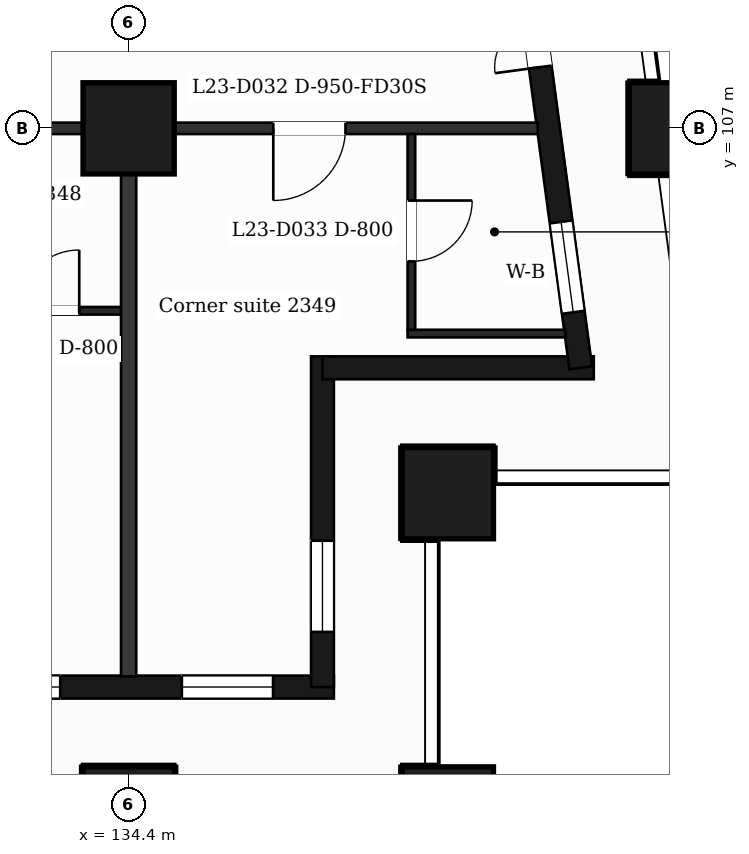
"""IFC4 building model, lengths in metres.
Left out: names, types, materials, properties, quantities, classifications, styles, units other than length and angle.
Written with IfcOpenShell. Run it as: python <this file> out.ifc"""

import sys

from ifc_helpers import new_model, si_unit, direction, frame, frame_2d, origin, origin_2d, place, context, subcontext, project, spatial, rectangle, extrude, element, fill, save


model = new_model("IFC4")
c1 = context("Model", 3, precision=1e-05, world=origin(), true_north=direction((0.0, 1.0)))
c2 = subcontext(c1, "Body", "Model", "MODEL_VIEW")
j1 = project(units=[si_unit("LENGTHUNIT", "METRE"), si_unit("PLANEANGLEUNIT", "RADIAN")], contexts=[c1])
p1 = place(None, origin())
s1 = spatial("IfcSite", under=j1, at=p1, CompositionType="ELEMENT")
p2 = place(p1, origin())
s2 = spatial("IfcBuilding", under=s1, at=p2, CompositionType="ELEMENT")
p3 = place(p2, frame((0.0, 0.0, 102.1)))
s3 = spatial("IfcBuildingStorey", under=s2, at=p3, CompositionType="ELEMENT", Elevation=102.1)
for number, where, z_axis, x_axis in (
    (1, (134.4, 98.0, 0.0), (0.0, 0.0, 1.0), (1.0, 0.0, 0.0)),
    (2, (138.6, 98.0, 0.0), (0.0, 0.0, 1.0), (1.0, 0.0, 0.0)),
    (3, (138.6, 102.2, 0.0), (0.0, 0.0, 1.0), (1.0, 0.0, 0.0)),
    (4, (134.4, 107.0, 0.0), (0.0, 0.0, 1.0), (1.0, 0.0, 0.0)),
    (5, (141.588, 107.0, 0.0), (0.0, 0.0, 1.0), (1.0, 0.0, 0.0)),
):
    element("IfcColumn", number, at=place(p3, frame(where, z_axis=z_axis, x_axis=x_axis)), inside=s3, PredefinedType="COLUMN", context=c2, shape_type="SweptSolid", body=[
        extrude(rectangle(XDim=1.2, YDim=1.2, at=origin_2d()), origin(), (0.0, 0.0, 1.0), 3.7),
    ])
p4 = place(p3, frame((89.85, 99.65, 0.0), z_axis=(0.0, 0.0, 1.0), x_axis=(1.0, 0.0, 0.0)))
e6 = element("IfcWall", 6, at=p4, inside=s3, PredefinedType="SOLIDWALL", context=c2, shape_type="SweptSolid", body=[
    extrude(rectangle(XDim=47.25, YDim=0.3, at=frame_2d((23.625, 0.0))), origin(), (0.0, 0.0, 1.0), 3.38),
])
p5 = place(p4, frame((0.725, 0.0, 0.9)))
e7 = element("IfcOpeningElement", 7, at=p5, cuts=e6, PredefinedType="OPENING", context=c2, shape_type="SweptSolid", body=[
    extrude(rectangle(XDim=1.2, YDim=2.1, at=frame_2d((0.6, 1.05))), frame((0.0, 0.16, 0.0), z_axis=(0.0, -1.0, 0.0), x_axis=(1.0, 0.0, 0.0)), (0.0, 0.0, 1.0), 0.32),
])
p6 = place(p4, frame((3.45, 0.0, 0.9)))
e8 = element("IfcOpeningElement", 8, at=p6, cuts=e6, PredefinedType="OPENING", context=c2, shape_type="SweptSolid", body=[
    extrude(rectangle(XDim=2.4, YDim=2.1, at=frame_2d((1.2, 1.05))), frame((0.0, 0.16, 0.0), z_axis=(0.0, -1.0, 0.0), x_axis=(1.0, 0.0, 0.0)), (0.0, 0.0, 1.0), 0.32),
])
p7 = place(p4, frame((7.35, 0.0, 0.0)))
e9 = element("IfcOpeningElement", 9, at=p7, cuts=e6, PredefinedType="OPENING", context=c2, shape_type="SweptSolid", body=[
    extrude(rectangle(XDim=1.2, YDim=2.4, at=frame_2d((0.6, 1.2))), frame((0.0, 0.16, 0.0), z_axis=(0.0, -1.0, 0.0), x_axis=(1.0, 0.0, 0.0)), (0.0, 0.0, 1.0), 0.32),
])
p8 = place(p4, frame((9.15, 0.0, 0.9)))
e10 = element("IfcOpeningElement", 10, at=p8, cuts=e6, PredefinedType="OPENING", context=c2, shape_type="SweptSolid", body=[
    extrude(rectangle(XDim=1.2, YDim=2.1, at=frame_2d((0.6, 1.05))), frame((0.0, 0.16, 0.0), z_axis=(0.0, -1.0, 0.0), x_axis=(1.0, 0.0, 0.0)), (0.0, 0.0, 1.0), 0.32),
])
p9 = place(p4, frame((11.85, 0.0, 0.9)))
e11 = element("IfcOpeningElement", 11, at=p9, cuts=e6, PredefinedType="OPENING", context=c2, shape_type="SweptSolid", body=[
    extrude(rectangle(XDim=2.4, YDim=2.1, at=frame_2d((1.2, 1.05))), frame((0.0, 0.16, 0.0), z_axis=(0.0, -1.0, 0.0), x_axis=(1.0, 0.0, 0.0)), (0.0, 0.0, 1.0), 0.32),
])
p10 = place(p4, frame((16.05, 0.0, 0.9)))
e12 = element("IfcOpeningElement", 12, at=p10, cuts=e6, PredefinedType="OPENING", context=c2, shape_type="SweptSolid", body=[
    extrude(rectangle(XDim=2.4, YDim=2.1, at=frame_2d((1.2, 1.05))), frame((0.0, 0.16, 0.0), z_axis=(0.0, -1.0, 0.0), x_axis=(1.0, 0.0, 0.0)), (0.0, 0.0, 1.0), 0.32),
])
p11 = place(p4, frame((20.85, 0.0, 0.9)))
e13 = element("IfcOpeningElement", 13, at=p11, cuts=e6, PredefinedType="OPENING", context=c2, shape_type="SweptSolid", body=[
    extrude(rectangle(XDim=1.2, YDim=2.1, at=frame_2d((0.6, 1.05))), frame((0.0, 0.16, 0.0), z_axis=(0.0, -1.0, 0.0), x_axis=(1.0, 0.0, 0.0)), (0.0, 0.0, 1.0), 0.32),
])
p12 = place(p4, frame((25.05, 0.0, 0.9)))
e14 = element("IfcOpeningElement", 14, at=p12, cuts=e6, PredefinedType="OPENING", context=c2, shape_type="SweptSolid", body=[
    extrude(rectangle(XDim=1.2, YDim=2.1, at=frame_2d((0.6, 1.05))), frame((0.0, 0.16, 0.0), z_axis=(0.0, -1.0, 0.0), x_axis=(1.0, 0.0, 0.0)), (0.0, 0.0, 1.0), 0.32),
])
p13 = place(p4, frame((28.65, 0.0, 0.9)))
e15 = element("IfcOpeningElement", 15, at=p13, cuts=e6, PredefinedType="OPENING", context=c2, shape_type="SweptSolid", body=[
    extrude(rectangle(XDim=2.4, YDim=2.1, at=frame_2d((1.2, 1.05))), frame((0.0, 0.16, 0.0), z_axis=(0.0, -1.0, 0.0), x_axis=(1.0, 0.0, 0.0)), (0.0, 0.0, 1.0), 0.32),
])
p14 = place(p4, frame((32.85, 0.0, 0.9)))
e16 = element("IfcOpeningElement", 16, at=p14, cuts=e6, PredefinedType="OPENING", context=c2, shape_type="SweptSolid", body=[
    extrude(rectangle(XDim=2.4, YDim=2.1, at=frame_2d((1.2, 1.05))), frame((0.0, 0.16, 0.0), z_axis=(0.0, -1.0, 0.0), x_axis=(1.0, 0.0, 0.0)), (0.0, 0.0, 1.0), 0.32),
])
p15 = place(p4, frame((37.05, 0.0, 0.9)))
e17 = element("IfcOpeningElement", 17, at=p15, cuts=e6, PredefinedType="OPENING", context=c2, shape_type="SweptSolid", body=[
    extrude(rectangle(XDim=2.4, YDim=2.1, at=frame_2d((1.2, 1.05))), frame((0.0, 0.16, 0.0), z_axis=(0.0, -1.0, 0.0), x_axis=(1.0, 0.0, 0.0)), (0.0, 0.0, 1.0), 0.32),
])
p16 = place(p4, frame((41.25, 0.0, 0.9)))
e18 = element("IfcOpeningElement", 18, at=p16, cuts=e6, PredefinedType="OPENING", context=c2, shape_type="SweptSolid", body=[
    extrude(rectangle(XDim=2.4, YDim=2.1, at=frame_2d((1.2, 1.05))), frame((0.0, 0.16, 0.0), z_axis=(0.0, -1.0, 0.0), x_axis=(1.0, 0.0, 0.0)), (0.0, 0.0, 1.0), 0.32),
])
p17 = place(p4, frame((45.25, 0.0, 0.9)))
e19 = element("IfcOpeningElement", 19, at=p17, cuts=e6, PredefinedType="OPENING", context=c2, shape_type="SweptSolid", body=[
    extrude(rectangle(XDim=1.2, YDim=2.1, at=frame_2d((0.6, 1.05))), frame((0.0, 0.16, 0.0), z_axis=(0.0, -1.0, 0.0), x_axis=(1.0, 0.0, 0.0)), (0.0, 0.0, 1.0), 0.32),
])
p18 = place(p3, frame((136.95, 99.65, 0.0), z_axis=(0.0, 0.0, 1.0), x_axis=(0.0, 1.0, 0.0)))
e20 = element("IfcWall", 20, at=p18, inside=s3, PredefinedType="SOLIDWALL", context=c2, shape_type="SweptSolid", body=[
    extrude(rectangle(XDim=4.35, YDim=0.3, at=frame_2d((2.175, 0.0))), origin(), (0.0, 0.0, 1.0), 3.38),
])
p19 = place(p18, frame((0.725, 0.0, 0.9)))
e21 = element("IfcOpeningElement", 21, at=p19, cuts=e20, PredefinedType="OPENING", context=c2, shape_type="SweptSolid", body=[
    extrude(rectangle(XDim=1.2, YDim=2.1, at=frame_2d((0.6, 1.05))), frame((0.0, 0.16, 0.0), z_axis=(0.0, -1.0, 0.0), x_axis=(1.0, 0.0, 0.0)), (0.0, 0.0, 1.0), 0.32),
])
p20 = place(p3, frame((136.95, 103.85, 0.0), z_axis=(0.0, 0.0, 1.0), x_axis=(1.0, 0.0, 0.0)))
e22 = element("IfcWall", 22, at=p20, inside=s3, PredefinedType="SOLIDWALL", context=c2, shape_type="SweptSolid", body=[
    extrude(rectangle(XDim=3.569, YDim=0.3, at=frame_2d((1.785, 0.0))), origin(), (0.0, 0.0, 1.0), 3.38),
])
p21 = place(p3, frame((140.348, 103.85, 0.0), z_axis=(0.0, 0.0, 1.0), x_axis=(-0.133431549479, 0.991058031401, 0.0)))
e23 = element("IfcWall", 23, at=p21, inside=s3, PredefinedType="SOLIDWALL", context=c2, shape_type="SweptSolid", body=[
    extrude(rectangle(XDim=6.609, YDim=0.3, at=frame_2d((3.304, 0.0))), origin(), (0.0, 0.0, 1.0), 3.38),
])
p22 = place(p21, frame((0.737, 0.0, 0.9)))
e24 = element("IfcOpeningElement", 24, at=p22, cuts=e23, PredefinedType="OPENING", context=c2, shape_type="SweptSolid", body=[
    extrude(rectangle(XDim=1.2, YDim=2.1, at=frame_2d((0.6, 1.05))), frame((0.0, 0.16, 0.0), z_axis=(0.0, -1.0, 0.0), x_axis=(1.0, 0.0, 0.0)), (0.0, 0.0, 1.0), 0.32),
])
p23 = place(p21, frame((3.991, 0.0, 0.0)))
e25 = element("IfcOpeningElement", 25, at=p23, cuts=e23, PredefinedType="OPENING", context=c2, shape_type="SweptSolid", body=[
    extrude(rectangle(XDim=1.2, YDim=2.4, at=frame_2d((0.6, 1.2))), frame((0.0, 0.16, 0.0), z_axis=(0.0, -1.0, 0.0), x_axis=(1.0, 0.0, 0.0)), (0.0, 0.0, 1.0), 0.32),
])
p24 = place(p3, frame((138.07, 104.3, 0.0), z_axis=(0.0, 0.0, 1.0), x_axis=(1.0, 0.0, 0.0)))
e26 = element("IfcWall", 26, at=p24, inside=s3, PredefinedType="PARTITIONING", context=c2, shape_type="SweptSolid", body=[
    extrude(rectangle(XDim=2.076, YDim=0.1, at=frame_2d((1.038, 0.0))), origin(), (0.0, 0.0, 1.0), 3.38),
])
p25 = place(p3, frame((131.65, 104.6, 0.0), z_axis=(0.0, 0.0, 1.0), x_axis=(1.0, 0.0, 0.0)))
e27 = element("IfcWall", 27, at=p25, inside=s3, PredefinedType="PARTITIONING", context=c2, shape_type="SweptSolid", body=[
    extrude(rectangle(XDim=2.75, YDim=0.1, at=frame_2d((1.375, 0.0))), origin(), (0.0, 0.0, 1.0), 3.38),
])
p26 = place(p25, frame((1.3, 0.0, 0.0)))
e28 = element("IfcOpeningElement", 28, at=p26, cuts=e27, PredefinedType="OPENING", context=c2, shape_type="SweptSolid", body=[
    extrude(rectangle(XDim=0.8, YDim=2.1, at=frame_2d((0.4, 1.05))), frame((0.0, 0.06, 0.0), z_axis=(0.0, -1.0, 0.0), x_axis=(1.0, 0.0, 0.0)), (0.0, 0.0, 1.0), 0.12),
])
p27 = place(p3, frame((87.018, 107.0, 0.0), z_axis=(0.0, 0.0, 1.0), x_axis=(1.0, 0.0, 0.0)))
e29 = element("IfcWall", 29, at=p27, inside=s3, PredefinedType="PARTITIONING", context=c2, shape_type="SweptSolid", body=[
    extrude(rectangle(XDim=52.765, YDim=0.15, at=frame_2d((26.382, 0.0))), origin(), (0.0, 0.0, 1.0), 3.38),
])
p28 = place(p27, frame((1.276, 0.0, 0.0)))
e30 = element("IfcOpeningElement", 30, at=p28, cuts=e29, PredefinedType="OPENING", context=c2, shape_type="SweptSolid", body=[
    extrude(rectangle(XDim=0.95, YDim=2.1, at=frame_2d((0.475, 1.05))), frame((0.0, 0.085, 0.0), z_axis=(0.0, -1.0, 0.0), x_axis=(1.0, 0.0, 0.0)), (0.0, 0.0, 1.0), 0.17),
])
p29 = place(p27, frame((6.152, 0.0, 0.0)))
e31 = element("IfcOpeningElement", 31, at=p29, cuts=e29, PredefinedType="OPENING", context=c2, shape_type="SweptSolid", body=[
    extrude(rectangle(XDim=0.95, YDim=2.1, at=frame_2d((0.475, 1.05))), frame((0.0, 0.085, 0.0), z_axis=(0.0, -1.0, 0.0), x_axis=(1.0, 0.0, 0.0)), (0.0, 0.0, 1.0), 0.17),
])
p30 = place(p27, frame((14.59, 0.0, 0.0)))
e32 = element("IfcOpeningElement", 32, at=p30, cuts=e29, PredefinedType="OPENING", context=c2, shape_type="SweptSolid", body=[
    extrude(rectangle(XDim=0.95, YDim=2.1, at=frame_2d((0.475, 1.05))), frame((0.0, 0.085, 0.0), z_axis=(0.0, -1.0, 0.0), x_axis=(1.0, 0.0, 0.0)), (0.0, 0.0, 1.0), 0.17),
])
p31 = place(p27, frame((18.257, 0.0, 0.0)))
e33 = element("IfcOpeningElement", 33, at=p31, cuts=e29, PredefinedType="OPENING", context=c2, shape_type="SweptSolid", body=[
    extrude(rectangle(XDim=0.95, YDim=2.1, at=frame_2d((0.475, 1.05))), frame((0.0, 0.085, 0.0), z_axis=(0.0, -1.0, 0.0), x_axis=(1.0, 0.0, 0.0)), (0.0, 0.0, 1.0), 0.17),
])
p32 = place(p27, frame((26.672, 0.0, 0.0)))
e34 = element("IfcOpeningElement", 34, at=p32, cuts=e29, PredefinedType="OPENING", context=c2, shape_type="SweptSolid", body=[
    extrude(rectangle(XDim=0.95, YDim=2.1, at=frame_2d((0.475, 1.05))), frame((0.0, 0.085, 0.0), z_axis=(0.0, -1.0, 0.0), x_axis=(1.0, 0.0, 0.0)), (0.0, 0.0, 1.0), 0.17),
])
p33 = place(p27, frame((31.392, 0.0, 0.0)))
e35 = element("IfcOpeningElement", 35, at=p33, cuts=e29, PredefinedType="OPENING", context=c2, shape_type="SweptSolid", body=[
    extrude(rectangle(XDim=0.95, YDim=2.1, at=frame_2d((0.475, 1.05))), frame((0.0, 0.085, 0.0), z_axis=(0.0, -1.0, 0.0), x_axis=(1.0, 0.0, 0.0)), (0.0, 0.0, 1.0), 0.17),
])
p34 = place(p27, frame((37.182, 0.0, 0.0)))
e36 = element("IfcOpeningElement", 36, at=p34, cuts=e29, PredefinedType="OPENING", context=c2, shape_type="SweptSolid", body=[
    extrude(rectangle(XDim=0.95, YDim=2.1, at=frame_2d((0.475, 1.05))), frame((0.0, 0.085, 0.0), z_axis=(0.0, -1.0, 0.0), x_axis=(1.0, 0.0, 0.0)), (0.0, 0.0, 1.0), 0.17),
])
p35 = place(p27, frame((41.762, 0.0, 0.0)))
e37 = element("IfcOpeningElement", 37, at=p35, cuts=e29, PredefinedType="OPENING", context=c2, shape_type="SweptSolid", body=[
    extrude(rectangle(XDim=0.95, YDim=2.1, at=frame_2d((0.475, 1.05))), frame((0.0, 0.085, 0.0), z_axis=(0.0, -1.0, 0.0), x_axis=(1.0, 0.0, 0.0)), (0.0, 0.0, 1.0), 0.17),
])
p36 = place(p27, frame((49.285, 0.0, 0.0)))
e38 = element("IfcOpeningElement", 38, at=p36, cuts=e29, PredefinedType="OPENING", context=c2, shape_type="SweptSolid", body=[
    extrude(rectangle(XDim=0.95, YDim=2.1, at=frame_2d((0.475, 1.05))), frame((0.0, 0.085, 0.0), z_axis=(0.0, -1.0, 0.0), x_axis=(1.0, 0.0, 0.0)), (0.0, 0.0, 1.0), 0.17),
])
p37 = place(p3, frame((134.4, 99.79, 0.0), z_axis=(0.0, 0.0, 1.0), x_axis=(0.0, 1.0, 0.0)))
e39 = element("IfcWall", 39, at=p37, inside=s3, PredefinedType="PARTITIONING", context=c2, shape_type="SweptSolid", body=[
    extrude(rectangle(XDim=7.135, YDim=0.2, at=frame_2d((3.567, 0.0))), origin(), (0.0, 0.0, 1.0), 3.38),
])
p38 = place(p3, frame((138.12, 104.35, 0.0), z_axis=(0.0, 0.0, 1.0), x_axis=(0.0, 1.0, 0.0)))
e40 = element("IfcWall", 40, at=p38, inside=s3, PredefinedType="PARTITIONING", context=c2, shape_type="SweptSolid", body=[
    extrude(rectangle(XDim=2.575, YDim=0.1, at=frame_2d((1.288, 0.0))), origin(), (0.0, 0.0, 1.0), 3.38),
])
p39 = place(p38, frame((0.9, 0.0, 0.0)))
e41 = element("IfcOpeningElement", 41, at=p39, cuts=e40, PredefinedType="OPENING", context=c2, shape_type="SweptSolid", body=[
    extrude(rectangle(XDim=0.8, YDim=2.1, at=frame_2d((0.4, 1.05))), frame((0.0, 0.06, 0.0), z_axis=(0.0, -1.0, 0.0), x_axis=(1.0, 0.0, 0.0)), (0.0, 0.0, 1.0), 0.12),
])
p40 = place(p16, origin())
e42 = element("IfcWindow", 42, at=p40, inside=s3, PartitioningType="SINGLE_PANEL", PredefinedType="WINDOW", context=c2, shape_type="SweptSolid", body=[
    extrude(rectangle(XDim=2.4, YDim=2.1, at=frame_2d((1.2, 1.05))), frame((0.0, 0.03, 0.0), z_axis=(0.0, -1.0, 0.0), x_axis=(1.0, 0.0, 0.0)), (0.0, 0.0, 1.0), 0.06),
])
fill(e18, e42)
p41 = place(p17, origin())
e43 = element("IfcWindow", 43, at=p41, inside=s3, PartitioningType="SINGLE_PANEL", PredefinedType="WINDOW", context=c2, shape_type="SweptSolid", body=[
    extrude(rectangle(XDim=1.2, YDim=2.1, at=frame_2d((0.6, 1.05))), frame((0.0, 0.03, 0.0), z_axis=(0.0, -1.0, 0.0), x_axis=(1.0, 0.0, 0.0)), (0.0, 0.0, 1.0), 0.06),
])
fill(e19, e43)
p42 = place(p19, origin())
e44 = element("IfcWindow", 44, at=p42, inside=s3, PartitioningType="SINGLE_PANEL", PredefinedType="WINDOW", context=c2, shape_type="SweptSolid", body=[
    extrude(rectangle(XDim=1.2, YDim=2.1, at=frame_2d((0.6, 1.05))), frame((0.0, 0.03, 0.0), z_axis=(0.0, -1.0, 0.0), x_axis=(1.0, 0.0, 0.0)), (0.0, 0.0, 1.0), 0.06),
])
fill(e21, e44)
p43 = place(p22, origin())
e45 = element("IfcWindow", 45, at=p43, inside=s3, PartitioningType="SINGLE_PANEL", PredefinedType="WINDOW", context=c2, shape_type="SweptSolid", body=[
    extrude(rectangle(XDim=1.2, YDim=2.1, at=frame_2d((0.6, 1.05))), frame((0.0, 0.03, 0.0), z_axis=(0.0, -1.0, 0.0), x_axis=(1.0, 0.0, 0.0)), (0.0, 0.0, 1.0), 0.06),
])
fill(e24, e45)
p44 = place(p23, origin())
e46 = element("IfcDoor", 46, at=p44, inside=s3, OperationType="DOUBLE_DOOR_SINGLE_SWING", PredefinedType="DOOR", context=c2, shape_type="SweptSolid", body=[
    extrude(rectangle(XDim=1.2, YDim=2.4, at=frame_2d((0.6, 1.2))), frame((0.0, 0.025, 0.0), z_axis=(0.0, -1.0, 0.0), x_axis=(1.0, 0.0, 0.0)), (0.0, 0.0, 1.0), 0.05),
])
fill(e25, e46)
p45 = place(p26, origin())
e47 = element("IfcDoor", 47, at=p45, inside=s3, OperationType="SINGLE_SWING_RIGHT", PredefinedType="DOOR", context=c2, shape_type="SweptSolid", body=[
    extrude(rectangle(XDim=0.8, YDim=2.1, at=frame_2d((0.4, 1.05))), frame((0.0, 0.025, 0.0), z_axis=(0.0, -1.0, 0.0), x_axis=(1.0, 0.0, 0.0)), (0.0, 0.0, 1.0), 0.05),
])
fill(e28, e47)
p46 = place(p36, origin())
e48 = element("IfcDoor", 48, at=p46, inside=s3, OperationType="SINGLE_SWING_LEFT", PredefinedType="DOOR", context=c2, shape_type="SweptSolid", body=[
    extrude(rectangle(XDim=0.95, YDim=2.1, at=frame_2d((0.475, 1.05))), frame((0.0, 0.025, 0.0), z_axis=(0.0, -1.0, 0.0), x_axis=(1.0, 0.0, 0.0)), (0.0, 0.0, 1.0), 0.05),
])
fill(e38, e48)
p47 = place(p39, origin())
e49 = element("IfcDoor", 49, at=p47, inside=s3, OperationType="SINGLE_SWING_RIGHT", PredefinedType="DOOR", context=c2, shape_type="SweptSolid", body=[
    extrude(rectangle(XDim=0.8, YDim=2.1, at=frame_2d((0.4, 1.05))), frame((0.0, 0.025, 0.0), z_axis=(0.0, -1.0, 0.0), x_axis=(1.0, 0.0, 0.0)), (0.0, 0.0, 1.0), 0.05),
])
fill(e41, e49)
save(model, sys.argv[1])
